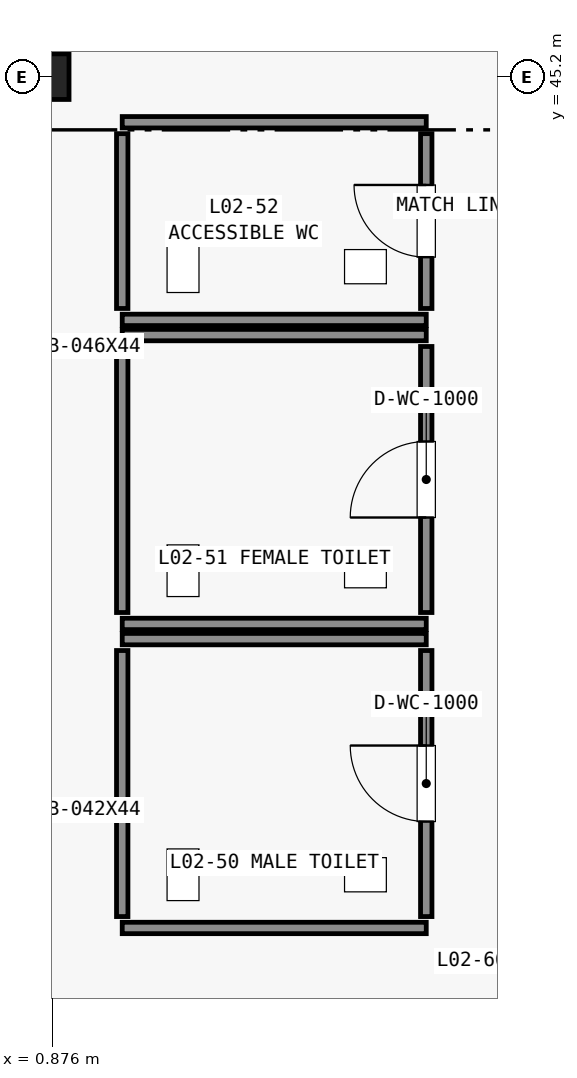
"""IFC4 building model, lengths in metres.
Left out: names, types, materials, properties, quantities, classifications, styles, units other than length and angle.
Written with IfcOpenShell. Run it as: python <this file> out.ifc"""

import sys

from ifc_helpers import new_model, si_unit, direction, frame, frame_2d, origin, origin_2d, place, context, subcontext, project, spatial, rectangle, extrude, element, fill, save


model = new_model("IFC4")
c1 = context("Model", 3, precision=1e-05, world=origin(), true_north=direction((0.0, 1.0)))
c2 = subcontext(c1, "Body", "Model", "MODEL_VIEW")
j1 = project(units=[si_unit("LENGTHUNIT", "METRE"), si_unit("PLANEANGLEUNIT", "RADIAN")], contexts=[c1])
p1 = place(None, origin())
s1 = spatial("IfcSite", under=j1, at=p1, CompositionType="ELEMENT")
p2 = place(p1, origin())
s2 = spatial("IfcBuilding", under=s1, at=p2, CompositionType="ELEMENT")
p3 = place(p2, frame((0.0, 0.0, 11.4)))
s3 = spatial("IfcBuildingStorey", under=s2, at=p3, CompositionType="ELEMENT", Elevation=11.4)
p4 = place(p3, frame((0.8, 45.2, 0.0), z_axis=(0.0, 0.0, 1.0), x_axis=(1.0, 0.0, 0.0)))
e1 = element("IfcColumn", 1, at=p4, inside=s3, PredefinedType="COLUMN", context=c2, shape_type="SweptSolid", body=[
    extrude(rectangle(XDim=0.6, YDim=0.6, at=origin_2d()), origin(), (0.0, 0.0, 1.0), 4.8),
])
for number, where, z_axis, x_axis in (
    (2, (1.8, 34.0, 0.0), (0.0, 0.0, 1.0), (1.0, 0.0, 0.0)),
    (3, (1.8, 37.8, 0.0), (0.0, 0.0, 1.0), (1.0, 0.0, 0.0)),
):
    element("IfcWall", number, at=place(p3, frame(where, z_axis=z_axis, x_axis=x_axis)), inside=s3, PredefinedType="STANDARD", context=c2, shape_type="SweptSolid", body=[
        extrude(rectangle(XDim=4.0, YDim=0.15, at=frame_2d((2.0, 0.0))), origin(), (0.0, 0.0, 1.0), 4.45),
    ])
p5 = place(p3, frame((1.8, 34.15, 0.0), z_axis=(0.0, 0.0, 1.0), x_axis=(0.0, 1.0, 0.0)))
e4 = element("IfcWall", 4, at=p5, inside=s3, PredefinedType="STANDARD", context=c2, shape_type="SweptSolid", body=[
    extrude(rectangle(XDim=3.5, YDim=0.15, at=frame_2d((1.75, 0.0))), origin(), (0.0, 0.0, 1.0), 4.45),
])
p6 = place(p3, frame((5.8, 34.15, 0.0), z_axis=(0.0, 0.0, 1.0), x_axis=(0.0, 1.0, 0.0)))
e5 = element("IfcWall", 5, at=p6, inside=s3, PredefinedType="STANDARD", context=c2, shape_type="SweptSolid", body=[
    extrude(rectangle(XDim=3.5, YDim=0.15, at=frame_2d((1.75, 0.0))), origin(), (0.0, 0.0, 1.0), 4.45),
])
p7 = place(p6, frame((1.25, 0.0, 0.0)))
e6 = element("IfcOpeningElement", 6, at=p7, cuts=e5, PredefinedType="OPENING", context=c2, shape_type="SweptSolid", body=[
    extrude(rectangle(XDim=1.0, YDim=2.15, at=frame_2d((0.5, 1.075))), frame((0.0, 0.085, 0.0), z_axis=(0.0, -1.0, 0.0), x_axis=(1.0, 0.0, 0.0)), (0.0, 0.0, 1.0), 0.17),
])
for number, where, z_axis, x_axis in (
    (7, (1.8, 38.0, 0.0), (0.0, 0.0, 1.0), (1.0, 0.0, 0.0)),
    (8, (1.8, 41.8, 0.0), (0.0, 0.0, 1.0), (1.0, 0.0, 0.0)),
):
    element("IfcWall", number, at=place(p3, frame(where, z_axis=z_axis, x_axis=x_axis)), inside=s3, PredefinedType="STANDARD", context=c2, shape_type="SweptSolid", body=[
        extrude(rectangle(XDim=4.0, YDim=0.15, at=frame_2d((2.0, 0.0))), origin(), (0.0, 0.0, 1.0), 4.45),
    ])
p8 = place(p3, frame((1.8, 38.15, 0.0), z_axis=(0.0, 0.0, 1.0), x_axis=(0.0, 1.0, 0.0)))
e9 = element("IfcWall", 9, at=p8, inside=s3, PredefinedType="STANDARD", context=c2, shape_type="SweptSolid", body=[
    extrude(rectangle(XDim=3.5, YDim=0.15, at=frame_2d((1.75, 0.0))), origin(), (0.0, 0.0, 1.0), 4.45),
])
p9 = place(p3, frame((5.8, 38.15, 0.0), z_axis=(0.0, 0.0, 1.0), x_axis=(0.0, 1.0, 0.0)))
e10 = element("IfcWall", 10, at=p9, inside=s3, PredefinedType="STANDARD", context=c2, shape_type="SweptSolid", body=[
    extrude(rectangle(XDim=3.5, YDim=0.15, at=frame_2d((1.75, 0.0))), origin(), (0.0, 0.0, 1.0), 4.45),
])
p10 = place(p9, frame((1.25, 0.0, 0.0)))
e11 = element("IfcOpeningElement", 11, at=p10, cuts=e10, PredefinedType="OPENING", context=c2, shape_type="SweptSolid", body=[
    extrude(rectangle(XDim=1.0, YDim=2.15, at=frame_2d((0.5, 1.075))), frame((0.0, 0.085, 0.0), z_axis=(0.0, -1.0, 0.0), x_axis=(1.0, 0.0, 0.0)), (0.0, 0.0, 1.0), 0.17),
])
p11 = place(p3, frame((1.8, 42.0, 0.0), z_axis=(0.0, 0.0, 1.0), x_axis=(1.0, 0.0, 0.0)))
e12 = element("IfcWall", 12, at=p11, inside=s3, PredefinedType="STANDARD", context=c2, shape_type="SweptSolid", body=[
    extrude(rectangle(XDim=4.0, YDim=0.15, at=frame_2d((2.0, 0.0))), origin(), (0.0, 0.0, 1.0), 4.45),
])
p12 = place(p3, frame((1.8, 44.6, 0.0), z_axis=(0.0, 0.0, 1.0), x_axis=(1.0, 0.0, 0.0)))
e13 = element("IfcWall", 13, at=p12, inside=s3, PredefinedType="STANDARD", context=c2, shape_type="SweptSolid", body=[
    extrude(rectangle(XDim=4.0, YDim=0.15, at=frame_2d((2.0, 0.0))), origin(), (0.0, 0.0, 1.0), 3.7),
])
p13 = place(p3, frame((1.8, 42.15, 0.0), z_axis=(0.0, 0.0, 1.0), x_axis=(0.0, 1.0, 0.0)))
e14 = element("IfcWall", 14, at=p13, inside=s3, PredefinedType="STANDARD", context=c2, shape_type="SweptSolid", body=[
    extrude(rectangle(XDim=2.3, YDim=0.15, at=frame_2d((1.15, 0.0))), origin(), (0.0, 0.0, 1.0), 4.45),
])
p14 = place(p3, frame((5.8, 42.15, 0.0), z_axis=(0.0, 0.0, 1.0), x_axis=(0.0, 1.0, 0.0)))
e15 = element("IfcWall", 15, at=p14, inside=s3, PredefinedType="STANDARD", context=c2, shape_type="SweptSolid", body=[
    extrude(rectangle(XDim=2.3, YDim=0.15, at=frame_2d((1.15, 0.0))), origin(), (0.0, 0.0, 1.0), 4.45),
])
p15 = place(p14, frame((0.675, 0.0, 0.0)))
e16 = element("IfcOpeningElement", 16, at=p15, cuts=e15, PredefinedType="OPENING", context=c2, shape_type="SweptSolid", body=[
    extrude(rectangle(XDim=0.95, YDim=2.15, at=frame_2d((0.475, 1.075))), frame((0.0, 0.085, 0.0), z_axis=(0.0, -1.0, 0.0), x_axis=(1.0, 0.0, 0.0)), (0.0, 0.0, 1.0), 0.17),
])
p16 = place(p7, origin())
e17 = element("IfcDoor", 17, at=p16, inside=s3, OperationType="SINGLE_SWING_RIGHT", PredefinedType="DOOR", context=c2, shape_type="SweptSolid", body=[
    extrude(rectangle(XDim=1.0, YDim=2.15, at=frame_2d((0.5, 1.075))), frame((0.0, 0.025, 0.0), z_axis=(0.0, -1.0, 0.0), x_axis=(1.0, 0.0, 0.0)), (0.0, 0.0, 1.0), 0.05),
])
fill(e6, e17)
p17 = place(p10, origin())
e18 = element("IfcDoor", 18, at=p17, inside=s3, OperationType="SINGLE_SWING_LEFT", PredefinedType="DOOR", context=c2, shape_type="SweptSolid", body=[
    extrude(rectangle(XDim=1.0, YDim=2.15, at=frame_2d((0.5, 1.075))), frame((0.0, 0.025, 0.0), z_axis=(0.0, -1.0, 0.0), x_axis=(1.0, 0.0, 0.0)), (0.0, 0.0, 1.0), 0.05),
])
fill(e11, e18)
p18 = place(p15, origin())
e19 = element("IfcDoor", 19, at=p18, inside=s3, OperationType="SINGLE_SWING_RIGHT", PredefinedType="DOOR", context=c2, shape_type="SweptSolid", body=[
    extrude(rectangle(XDim=0.95, YDim=2.15, at=frame_2d((0.475, 1.075))), frame((0.0, 0.025, 0.0), z_axis=(0.0, -1.0, 0.0), x_axis=(1.0, 0.0, 0.0)), (0.0, 0.0, 1.0), 0.05),
])
fill(e16, e19)
save(model, sys.argv[1])
